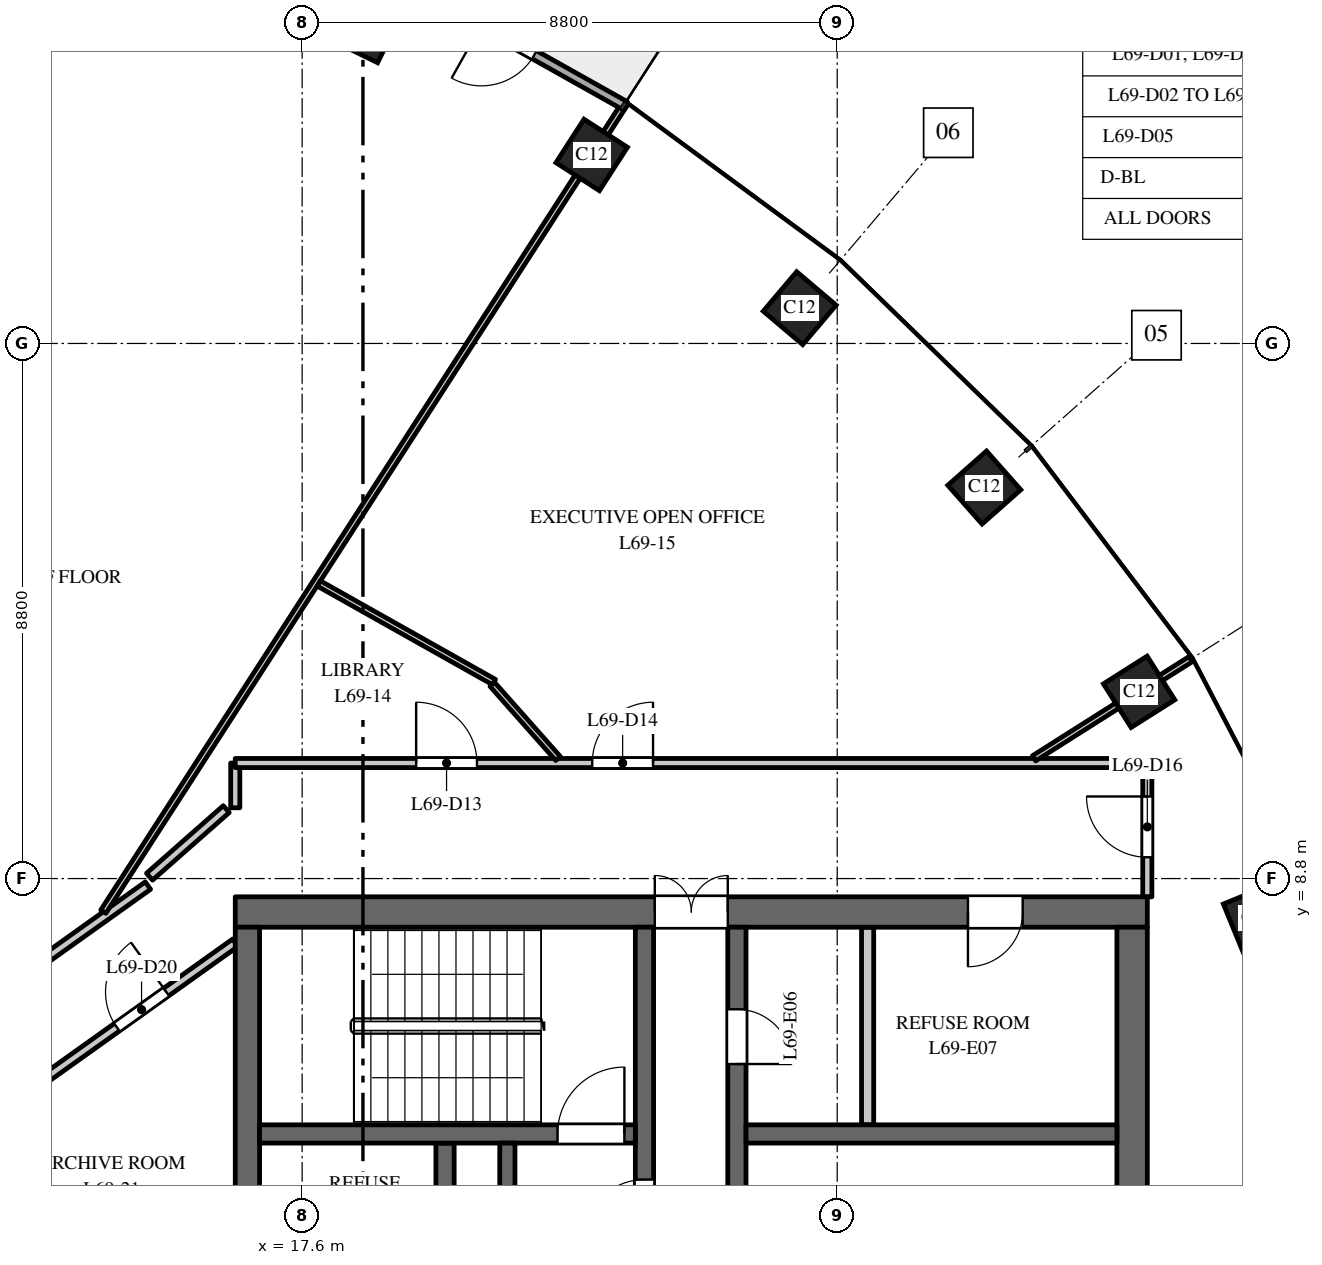
"""IFC4 building model, lengths in metres.
Left out: names, types, materials, properties, quantities, classifications, styles, units other than length and angle.
Written with IfcOpenShell. Run it as: python <this file> out.ifc"""

import sys

from ifc_helpers import new_model, si_unit, direction, frame, frame_2d, origin, origin_2d, place, context, subcontext, project, spatial, rectangle, extrude, element, fill, save


model = new_model("IFC4")
c1 = context("Model", 3, precision=1e-05, world=origin(), true_north=direction((0.0, 1.0)))
c2 = subcontext(c1, "Body", "Model", "MODEL_VIEW")
j1 = project(units=[si_unit("LENGTHUNIT", "METRE"), si_unit("PLANEANGLEUNIT", "RADIAN")], contexts=[c1])
p1 = place(None, origin())
s1 = spatial("IfcSite", under=j1, at=p1, CompositionType="ELEMENT")
p2 = place(p1, origin())
s2 = spatial("IfcBuilding", under=s1, at=p2, CompositionType="ELEMENT")
p3 = place(p2, frame((0.0, 0.0, 319.0)))
s3 = spatial("IfcBuildingStorey", under=s2, at=p3, CompositionType="ELEMENT", Elevation=319.0)
for number, where, z_axis, x_axis in (
    (1, (33.305, 8.149, 0.0), (0.0, 0.0, 1.0), (-0.379, 0.925, 0.0)),
    (2, (31.365, 11.871, 0.0), (0.0, 0.0, 1.0), (-0.535, 0.845, 0.0)),
    (3, (28.819, 15.23, 0.0), (0.0, 0.0, 1.0), (-0.663, 0.749, 0.0)),
    (4, (25.783, 18.18, 0.0), (0.0, 0.0, 1.0), (-0.763, 0.646, 0.0)),
    (5, (22.362, 20.7, 0.0), (0.0, 0.0, 1.0), (-0.84, 0.542, 0.0)),
    (6, (18.646, 22.785, 0.0), (0.0, 0.0, 1.0), (-0.898, 0.439, 0.0)),
):
    element("IfcColumn", number, at=place(p3, frame(where, z_axis=z_axis, x_axis=x_axis)), inside=s3, PredefinedType="COLUMN", context=c2, shape_type="SweptSolid", body=[
        extrude(rectangle(XDim=0.85, YDim=0.85, at=origin_2d()), origin(), (0.0, 0.0, 1.0), 4.0),
    ])
p4 = place(p3, frame((16.5, 8.25, 0.0), z_axis=(0.0, 0.0, 1.0), x_axis=(1.0, 0.0, 0.0)))
e7 = element("IfcWall", 7, at=p4, inside=s3, PredefinedType="SHEAR", context=c2, shape_type="SweptSolid", body=[
    extrude(rectangle(XDim=15.0, YDim=0.5, at=frame_2d((7.5, 0.0))), origin(), (0.0, 0.0, 1.0), 3.7),
])
p5 = place(p4, frame((6.9, 0.0, 0.0)))
e8 = element("IfcOpeningElement", 8, at=p5, cuts=e7, PredefinedType="OPENING", context=c2, shape_type="SweptSolid", body=[
    extrude(rectangle(XDim=1.2, YDim=2.1, at=frame_2d((0.6, 1.05))), frame((0.0, 0.26, 0.0), z_axis=(0.0, -1.0, 0.0), x_axis=(1.0, 0.0, 0.0)), (0.0, 0.0, 1.0), 0.52),
])
p6 = place(p4, frame((12.05, 0.0, 0.0)))
e9 = element("IfcOpeningElement", 9, at=p6, cuts=e7, PredefinedType="OPENING", context=c2, shape_type="SweptSolid", body=[
    extrude(rectangle(XDim=0.9, YDim=2.1, at=frame_2d((0.45, 1.05))), frame((0.0, 0.26, 0.0), z_axis=(0.0, -1.0, 0.0), x_axis=(1.0, 0.0, 0.0)), (0.0, 0.0, 1.0), 0.52),
])
p7 = place(p3, frame((19.95, -4.45, 0.0), z_axis=(0.0, 0.0, 1.0), x_axis=(0.0, 1.0, 0.0)))
e10 = element("IfcWall", 10, at=p7, inside=s3, PredefinedType="SHEAR", context=c2, shape_type="SweptSolid", body=[
    extrude(rectangle(XDim=8.9, YDim=0.3, at=frame_2d((4.45, 0.0))), origin(), (0.0, 0.0, 1.0), 3.7),
])
p8 = place(p7, frame((0.775, 0.0, 0.0)))
e11 = element("IfcOpeningElement", 11, at=p8, cuts=e10, PredefinedType="OPENING", context=c2, shape_type="SweptSolid", body=[
    extrude(rectangle(XDim=1.2, YDim=2.1, at=frame_2d((0.6, 1.05))), frame((0.0, 0.16, 0.0), z_axis=(0.0, -1.0, 0.0), x_axis=(1.0, 0.0, 0.0)), (0.0, 0.0, 1.0), 0.32),
])
p9 = place(p7, frame((6.0, 0.0, 0.0)))
e12 = element("IfcOpeningElement", 12, at=p9, cuts=e10, PredefinedType="OPENING", context=c2, shape_type="SweptSolid", body=[
    extrude(rectangle(XDim=0.9, YDim=2.1, at=frame_2d((0.45, 1.05))), frame((0.0, 0.16, 0.0), z_axis=(0.0, -1.0, 0.0), x_axis=(1.0, 0.0, 0.0)), (0.0, 0.0, 1.0), 0.32),
])
p10 = place(p3, frame((24.75, -8.0, 0.0), z_axis=(0.0, 0.0, 1.0), x_axis=(0.0, 1.0, 0.0)))
e13 = element("IfcWall", 13, at=p10, inside=s3, PredefinedType="SHEAR", context=c2, shape_type="SweptSolid", body=[
    extrude(rectangle(XDim=16.0, YDim=0.3, at=frame_2d((8.0, 0.0))), origin(), (0.0, 0.0, 1.0), 3.7),
])
p11 = place(p10, frame((4.425, 0.0, 0.0)))
e14 = element("IfcOpeningElement", 14, at=p11, cuts=e13, PredefinedType="OPENING", context=c2, shape_type="SweptSolid", body=[
    extrude(rectangle(XDim=1.1, YDim=2.1, at=frame_2d((0.55, 1.05))), frame((0.0, 0.16, 0.0), z_axis=(0.0, -1.0, 0.0), x_axis=(1.0, 0.0, 0.0)), (0.0, 0.0, 1.0), 0.32),
])
p12 = place(p10, frame((7.45, 0.0, 0.0)))
e15 = element("IfcOpeningElement", 15, at=p12, cuts=e13, PredefinedType="OPENING", context=c2, shape_type="SweptSolid", body=[
    extrude(rectangle(XDim=1.1, YDim=2.1, at=frame_2d((0.55, 1.05))), frame((0.0, 0.16, 0.0), z_axis=(0.0, -1.0, 0.0), x_axis=(1.0, 0.0, 0.0)), (0.0, 0.0, 1.0), 0.32),
])
p13 = place(p10, frame((10.575, 0.0, 0.0)))
e16 = element("IfcOpeningElement", 16, at=p13, cuts=e13, PredefinedType="OPENING", context=c2, shape_type="SweptSolid", body=[
    extrude(rectangle(XDim=0.9, YDim=2.1, at=frame_2d((0.45, 1.05))), frame((0.0, 0.16, 0.0), z_axis=(0.0, -1.0, 0.0), x_axis=(1.0, 0.0, 0.0)), (0.0, 0.0, 1.0), 0.32),
])
p14 = place(p10, frame((13.75, 0.0, 0.0)))
e17 = element("IfcOpeningElement", 17, at=p14, cuts=e13, PredefinedType="OPENING", context=c2, shape_type="SweptSolid", body=[
    extrude(rectangle(XDim=0.9, YDim=2.1, at=frame_2d((0.45, 1.05))), frame((0.0, 0.16, 0.0), z_axis=(0.0, -1.0, 0.0), x_axis=(1.0, 0.0, 0.0)), (0.0, 0.0, 1.0), 0.32),
])
p15 = place(p10, frame((1.35, 0.0, 0.0)))
e18 = element("IfcOpeningElement", 18, at=p15, cuts=e13, PredefinedType="OPENING", context=c2, shape_type="SweptSolid", body=[
    extrude(rectangle(XDim=0.9, YDim=2.1, at=frame_2d((0.45, 1.05))), frame((0.0, 0.16, 0.0), z_axis=(0.0, -1.0, 0.0), x_axis=(1.0, 0.0, 0.0)), (0.0, 0.0, 1.0), 0.32),
])
p16 = place(p3, frame((16.7, -8.0, 0.0), z_axis=(0.0, 0.0, 1.0), x_axis=(0.0, 1.0, 0.0)))
e19 = element("IfcWall", 19, at=p16, inside=s3, PredefinedType="SHEAR", context=c2, shape_type="SweptSolid", body=[
    extrude(rectangle(XDim=16.0, YDim=0.4, at=frame_2d((8.0, 0.0))), origin(), (0.0, 0.0, 1.0), 3.7),
])
p17 = place(p3, frame((31.25, -8.0, 0.0), z_axis=(0.0, 0.0, 1.0), x_axis=(0.0, 1.0, 0.0)))
e20 = element("IfcWall", 20, at=p17, inside=s3, PredefinedType="SHEAR", context=c2, shape_type="SweptSolid", body=[
    extrude(rectangle(XDim=16.0, YDim=0.5, at=frame_2d((8.0, 0.0))), origin(), (0.0, 0.0, 1.0), 3.7),
])
p18 = place(p3, frame((24.9, 4.6, 0.0), z_axis=(0.0, 0.0, 1.0), x_axis=(1.0, 0.0, 0.0)))
e21 = element("IfcWall", 21, at=p18, inside=s3, PredefinedType="SHEAR", context=c2, shape_type="SweptSolid", body=[
    extrude(rectangle(XDim=6.1, YDim=0.3, at=frame_2d((3.05, 0.0))), origin(), (0.0, 0.0, 1.0), 3.7),
])
p19 = place(p3, frame((26.9, 4.75, 0.0), z_axis=(0.0, 0.0, 1.0), x_axis=(0.0, 1.0, 0.0)))
e22 = element("IfcWall", 22, at=p19, inside=s3, PredefinedType="PARTITIONING", context=c2, shape_type="SweptSolid", body=[
    extrude(rectangle(XDim=3.25, YDim=0.2, at=frame_2d((1.625, 0.0))), origin(), (0.0, 0.0, 1.0), 3.7),
])
p20 = place(p3, frame((23.23, 2.25, 0.0), z_axis=(0.0, 0.0, 1.0), x_axis=(0.0, 1.0, 0.0)))
e23 = element("IfcWall", 23, at=p20, inside=s3, PredefinedType="SHEAR", context=c2, shape_type="SweptSolid", body=[
    extrude(rectangle(XDim=5.75, YDim=0.3, at=frame_2d((2.875, 0.0))), origin(), (0.0, 0.0, 1.0), 3.7),
])
p21 = place(p20, frame((0.6, 0.0, 0.0)))
e24 = element("IfcOpeningElement", 24, at=p21, cuts=e23, PredefinedType="OPENING", context=c2, shape_type="SweptSolid", body=[
    extrude(rectangle(XDim=1.0, YDim=2.1, at=frame_2d((0.5, 1.05))), frame((0.0, 0.16, 0.0), z_axis=(0.0, -1.0, 0.0), x_axis=(1.0, 0.0, 0.0)), (0.0, 0.0, 1.0), 0.32),
])
p22 = place(p3, frame((16.9, 4.6, 0.0), z_axis=(0.0, 0.0, 1.0), x_axis=(1.0, 0.0, 0.0)))
e25 = element("IfcWall", 25, at=p22, inside=s3, PredefinedType="SHEAR", context=c2, shape_type="SweptSolid", body=[
    extrude(rectangle(XDim=6.18, YDim=0.3, at=frame_2d((3.09, 0.0))), origin(), (0.0, 0.0, 1.0), 3.7),
])
p23 = place(p22, frame((4.9, 0.0, 0.0)))
e26 = element("IfcOpeningElement", 26, at=p23, cuts=e25, PredefinedType="OPENING", context=c2, shape_type="SweptSolid", body=[
    extrude(rectangle(XDim=1.1, YDim=2.1, at=frame_2d((0.55, 1.05))), frame((0.0, 0.16, 0.0), z_axis=(0.0, -1.0, 0.0), x_axis=(1.0, 0.0, 0.0)), (0.0, 0.0, 1.0), 0.32),
])
p24 = place(p3, frame((20.975, 2.25, 0.0), z_axis=(0.0, 0.0, 1.0), x_axis=(0.0, 1.0, 0.0)))
e27 = element("IfcWall", 27, at=p24, inside=s3, PredefinedType="SHEAR", context=c2, shape_type="SweptSolid", body=[
    extrude(rectangle(XDim=2.2, YDim=0.25, at=frame_2d((1.1, 0.0))), origin(), (0.0, 0.0, 1.0), 3.7),
])
p25 = place(p3, frame((22.913, 21.509, 0.0), z_axis=(0.0, 0.0, 1.0), x_axis=(-0.872046572975, 0.489422899509, 0.0)))
e28 = element("IfcWall", 28, at=p25, inside=s3, PredefinedType="STANDARD", context=c2, shape_type="SweptSolid", body=[
    extrude(rectangle(XDim=4.426, YDim=0.15, at=frame_2d((2.213, 0.0))), origin(), (0.0, 0.0, 1.0), 3.7),
])
p26 = place(p25, frame((1.713, 0.0, 0.0)))
e29 = element("IfcOpeningElement", 29, at=p26, cuts=e28, PredefinedType="OPENING", context=c2, shape_type="SweptSolid", body=[
    extrude(rectangle(XDim=1.0, YDim=2.4, at=frame_2d((0.5, 1.2))), frame((0.0, 0.085, 0.0), z_axis=(0.0, -1.0, 0.0), x_axis=(1.0, 0.0, 0.0)), (0.0, 0.0, 1.0), 0.17),
])
p27 = place(p3, frame((10.208, 5.221, 0.0), z_axis=(0.0, 0.0, 1.0), x_axis=(0.814106730479, 0.580715275663, 0.0)))
e30 = element("IfcWall", 30, at=p27, inside=s3, PredefinedType="PARTITIONING", context=c2, shape_type="SweptSolid", body=[
    extrude(rectangle(XDim=5.964, YDim=0.15, at=frame_2d((2.982, 0.0))), origin(), (0.0, 0.0, 1.0), 2.75),
])
p28 = place(p3, frame((10.97, 3.799, 0.0), z_axis=(0.0, 0.0, 1.0), x_axis=(0.814095150002, 0.580731510032, 0.0)))
e31 = element("IfcWall", 31, at=p28, inside=s3, PredefinedType="PARTITIONING", context=c2, shape_type="SweptSolid", body=[
    extrude(rectangle(XDim=6.793, YDim=0.15, at=frame_2d((3.396, 0.0))), origin(), (0.0, 0.0, 1.0), 3.7),
])
p29 = place(p28, frame((4.4, 0.0, 0.0)))
e32 = element("IfcOpeningElement", 32, at=p29, cuts=e31, PredefinedType="OPENING", context=c2, shape_type="SweptSolid", body=[
    extrude(rectangle(XDim=1.0, YDim=2.1, at=frame_2d((0.5, 1.05))), frame((0.0, 0.085, 0.0), z_axis=(0.0, -1.0, 0.0), x_axis=(1.0, 0.0, 0.0)), (0.0, 0.0, 1.0), 0.17),
])
p30 = place(p3, frame((14.33, 8.256, 0.0), z_axis=(0.0, 0.0, 1.0), x_axis=(0.542279133869, 0.840198393816, 0.0)))
e33 = element("IfcWall", 33, at=p30, inside=s3, PredefinedType="PARTITIONING", context=c2, shape_type="SweptSolid", body=[
    extrude(rectangle(XDim=15.813, YDim=0.1, at=frame_2d((7.906, 0.0))), origin(), (0.0, 0.0, 1.0), 3.7),
])
p31 = place(p3, frame((16.5, 9.964, 0.0), z_axis=(0.0, 0.0, 1.0), x_axis=(0.0, 1.0, 0.0)))
e34 = element("IfcWall", 34, at=p31, inside=s3, PredefinedType="PARTITIONING", context=c2, shape_type="SweptSolid", body=[
    extrude(rectangle(XDim=0.736, YDim=0.15, at=frame_2d((0.368, 0.0))), origin(), (0.0, 0.0, 1.0), 3.7),
])
p32 = place(p3, frame((16.5, 10.7, 0.0), z_axis=(0.0, 0.0, 1.0), x_axis=(1.0, 0.0, 0.0)))
e35 = element("IfcWall", 35, at=p32, inside=s3, PredefinedType="PARTITIONING", context=c2, shape_type="SweptSolid", body=[
    extrude(rectangle(XDim=15.0, YDim=0.15, at=frame_2d((7.5, 0.0))), origin(), (0.0, 0.0, 1.0), 2.75),
])
p33 = place(p32, frame((2.975, 0.0, 0.0)))
e36 = element("IfcOpeningElement", 36, at=p33, cuts=e35, PredefinedType="OPENING", context=c2, shape_type="SweptSolid", body=[
    extrude(rectangle(XDim=1.0, YDim=2.1, at=frame_2d((0.5, 1.05))), frame((0.0, 0.085, 0.0), z_axis=(0.0, -1.0, 0.0), x_axis=(1.0, 0.0, 0.0)), (0.0, 0.0, 1.0), 0.17),
])
p34 = place(p32, frame((5.871, 0.0, 0.0)))
e37 = element("IfcOpeningElement", 37, at=p34, cuts=e35, PredefinedType="OPENING", context=c2, shape_type="SweptSolid", body=[
    extrude(rectangle(XDim=1.0, YDim=2.1, at=frame_2d((0.5, 1.05))), frame((0.0, 0.085, 0.0), z_axis=(0.0, -1.0, 0.0), x_axis=(1.0, 0.0, 0.0)), (0.0, 0.0, 1.0), 0.17),
])
p35 = place(p3, frame((17.874, 13.653, 0.0), z_axis=(0.0, 0.0, 1.0), x_axis=(0.871459194926, -0.490468012799, 0.0)))
e38 = element("IfcWall", 38, at=p35, inside=s3, PredefinedType="PARTITIONING", context=c2, shape_type="SweptSolid", body=[
    extrude(rectangle(XDim=3.307, YDim=0.1, at=frame_2d((1.654, 0.0))), origin(), (0.0, 0.0, 1.0), 3.7),
])
p36 = place(p3, frame((20.727, 11.994, 0.0), z_axis=(0.0, 0.0, 1.0), x_axis=(0.663507744466, -0.748169414661, 0.0)))
e39 = element("IfcWall", 39, at=p36, inside=s3, PredefinedType="PARTITIONING", context=c2, shape_type="SweptSolid", body=[
    extrude(rectangle(XDim=1.629, YDim=0.1, at=frame_2d((0.815, 0.0))), origin(), (0.0, 0.0, 1.0), 2.75),
])
p37 = place(p3, frame((29.637, 10.777, 0.0), z_axis=(0.0, 0.0, 1.0), x_axis=(0.844810627195, 0.535065420467, 0.0)))
e40 = element("IfcWall", 40, at=p37, inside=s3, PredefinedType="PARTITIONING", context=c2, shape_type="SweptSolid", body=[
    extrude(rectangle(XDim=3.048, YDim=0.1, at=frame_2d((1.524, 0.0))), origin(), (0.0, 0.0, 1.0), 3.0),
])
p38 = place(p3, frame((31.5, 8.5, 0.0), z_axis=(0.0, 0.0, 1.0), x_axis=(0.0, 1.0, 0.0)))
e41 = element("IfcWall", 41, at=p38, inside=s3, PredefinedType="PARTITIONING", context=c2, shape_type="SweptSolid", body=[
    extrude(rectangle(XDim=2.2, YDim=0.15, at=frame_2d((1.1, 0.0))), origin(), (0.0, 0.0, 1.0), 3.0),
])
p39 = place(p38, frame((0.65, 0.0, 0.0)))
e42 = element("IfcOpeningElement", 42, at=p39, cuts=e41, PredefinedType="OPENING", context=c2, shape_type="SweptSolid", body=[
    extrude(rectangle(XDim=1.0, YDim=2.1, at=frame_2d((0.5, 1.05))), frame((0.0, 0.085, 0.0), z_axis=(0.0, -1.0, 0.0), x_axis=(1.0, 0.0, 0.0)), (0.0, 0.0, 1.0), 0.17),
])
p40 = place(p3, frame((15.09, 8.831, 0.0), z_axis=(0.0, 0.0, 1.0), x_axis=(0.750621325629, 0.660732642989, 0.0)))
e43 = element("IfcWall", 43, at=p40, inside=s3, PredefinedType="PARTITIONING", context=c2, shape_type="SweptSolid", body=[
    extrude(rectangle(XDim=1.681, YDim=0.15, at=frame_2d((0.841, 0.0))), origin(), (0.0, 0.0, 1.0), 3.7),
])
p41 = place(p23, origin())
e44 = element("IfcDoor", 44, at=p41, inside=s3, OperationType="SINGLE_SWING_LEFT", PredefinedType="DOOR", context=c2, shape_type="SweptSolid", body=[
    extrude(rectangle(XDim=1.1, YDim=2.1, at=frame_2d((0.55, 1.05))), frame((0.0, 0.025, 0.0), z_axis=(0.0, -1.0, 0.0), x_axis=(1.0, 0.0, 0.0)), (0.0, 0.0, 1.0), 0.05),
])
fill(e26, e44)
p42 = place(p21, origin())
e45 = element("IfcDoor", 45, at=p42, inside=s3, OperationType="SINGLE_SWING_RIGHT", PredefinedType="DOOR", context=c2, shape_type="SweptSolid", body=[
    extrude(rectangle(XDim=1.0, YDim=2.1, at=frame_2d((0.5, 1.05))), frame((0.0, 0.025, 0.0), z_axis=(0.0, -1.0, 0.0), x_axis=(1.0, 0.0, 0.0)), (0.0, 0.0, 1.0), 0.05),
])
fill(e24, e45)
p43 = place(p5, origin())
e46 = element("IfcDoor", 46, at=p43, inside=s3, OperationType="DOUBLE_DOOR_DOUBLE_SWING", PredefinedType="DOOR", context=c2, shape_type="SweptSolid", body=[
    extrude(rectangle(XDim=1.2, YDim=2.1, at=frame_2d((0.6, 1.05))), frame((0.0, 0.025, 0.0), z_axis=(0.0, -1.0, 0.0), x_axis=(1.0, 0.0, 0.0)), (0.0, 0.0, 1.0), 0.05),
])
fill(e8, e46)
p44 = place(p14, origin())
e47 = element("IfcDoor", 47, at=p44, inside=s3, OperationType="SINGLE_SWING_LEFT", PredefinedType="DOOR", context=c2, shape_type="SweptSolid", body=[
    extrude(rectangle(XDim=0.9, YDim=2.1, at=frame_2d((0.45, 1.05))), frame((0.0, 0.025, 0.0), z_axis=(0.0, -1.0, 0.0), x_axis=(1.0, 0.0, 0.0)), (0.0, 0.0, 1.0), 0.05),
])
fill(e17, e47)
p45 = place(p6, origin())
e48 = element("IfcDoor", 48, at=p45, inside=s3, OperationType="SINGLE_SWING_LEFT", PredefinedType="DOOR", context=c2, shape_type="SweptSolid", body=[
    extrude(rectangle(XDim=0.9, YDim=2.1, at=frame_2d((0.45, 1.05))), frame((0.0, 0.025, 0.0), z_axis=(0.0, -1.0, 0.0), x_axis=(1.0, 0.0, 0.0)), (0.0, 0.0, 1.0), 0.05),
])
fill(e9, e48)
p46 = place(p26, origin())
e49 = element("IfcDoor", 49, at=p46, inside=s3, OperationType="SINGLE_SWING_RIGHT", PredefinedType="DOOR", context=c2, shape_type="SweptSolid", body=[
    extrude(rectangle(XDim=1.0, YDim=2.4, at=frame_2d((0.5, 1.2))), frame((0.0, 0.025, 0.0), z_axis=(0.0, -1.0, 0.0), x_axis=(1.0, 0.0, 0.0)), (0.0, 0.0, 1.0), 0.05),
])
fill(e29, e49)
p47 = place(p33, origin())
e50 = element("IfcDoor", 50, at=p47, inside=s3, OperationType="SINGLE_SWING_LEFT", PredefinedType="DOOR", context=c2, shape_type="SweptSolid", body=[
    extrude(rectangle(XDim=1.0, YDim=2.1, at=frame_2d((0.5, 1.05))), frame((0.0, 0.025, 0.0), z_axis=(0.0, -1.0, 0.0), x_axis=(1.0, 0.0, 0.0)), (0.0, 0.0, 1.0), 0.05),
])
fill(e36, e50)
p48 = place(p34, origin())
e51 = element("IfcDoor", 51, at=p48, inside=s3, OperationType="SINGLE_SWING_RIGHT", PredefinedType="DOOR", context=c2, shape_type="SweptSolid", body=[
    extrude(rectangle(XDim=1.0, YDim=2.1, at=frame_2d((0.5, 1.05))), frame((0.0, 0.025, 0.0), z_axis=(0.0, -1.0, 0.0), x_axis=(1.0, 0.0, 0.0)), (0.0, 0.0, 1.0), 0.05),
])
fill(e37, e51)
p49 = place(p39, origin())
e52 = element("IfcDoor", 52, at=p49, inside=s3, OperationType="SINGLE_SWING_RIGHT", PredefinedType="DOOR", context=c2, shape_type="SweptSolid", body=[
    extrude(rectangle(XDim=1.0, YDim=2.1, at=frame_2d((0.5, 1.05))), frame((0.0, 0.025, 0.0), z_axis=(0.0, -1.0, 0.0), x_axis=(1.0, 0.0, 0.0)), (0.0, 0.0, 1.0), 0.05),
])
fill(e42, e52)
p50 = place(p29, origin())
e53 = element("IfcDoor", 53, at=p50, inside=s3, OperationType="SINGLE_SWING_RIGHT", PredefinedType="DOOR", context=c2, shape_type="SweptSolid", body=[
    extrude(rectangle(XDim=1.0, YDim=2.1, at=frame_2d((0.5, 1.05))), frame((0.0, 0.025, 0.0), z_axis=(0.0, -1.0, 0.0), x_axis=(1.0, 0.0, 0.0)), (0.0, 0.0, 1.0), 0.05),
])
fill(e32, e53)
save(model, sys.argv[1])
